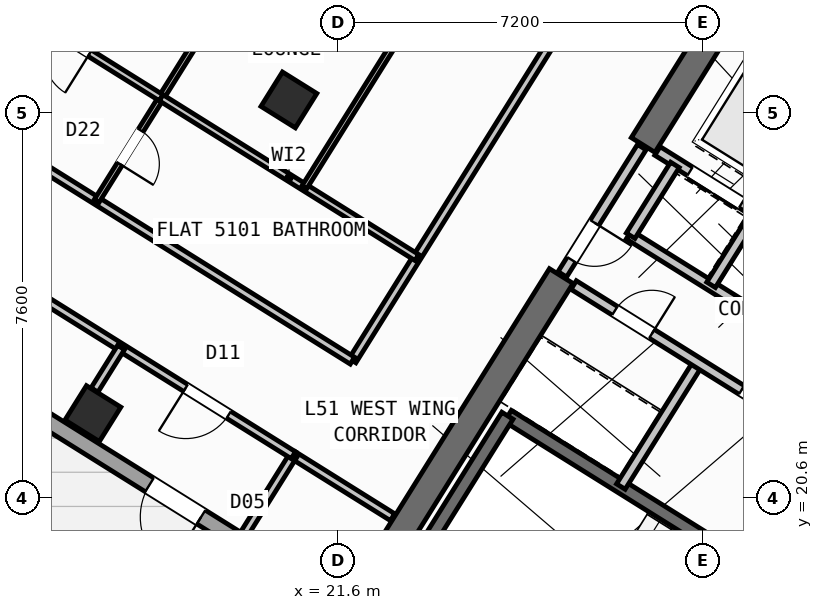
"""IFC4 building model, lengths in metres.
Left out: names, types, materials, properties, quantities, classifications, styles, units other than length and angle.
Written with IfcOpenShell. Run it as: python <this file> out.ifc"""

import sys

from ifc_helpers import new_model, si_unit, direction, frame, frame_2d, origin, origin_2d, place, context, subcontext, project, spatial, rectangle, hollow_rectangle, extrude, source, transform, mapped, element, fill, save


model = new_model("IFC4")
c1 = context("Model", 3, precision=1e-05, world=origin(), true_north=direction((0.0, 1.0)))
c2 = subcontext(c1, "Body", "Model", "MODEL_VIEW")
j1 = project(units=[si_unit("LENGTHUNIT", "METRE"), si_unit("PLANEANGLEUNIT", "RADIAN")], contexts=[c1])
p1 = place(None, origin())
s1 = spatial("IfcSite", under=j1, at=p1, CompositionType="ELEMENT")
p2 = place(p1, origin())
s2 = spatial("IfcBuilding", under=s1, at=p2, CompositionType="ELEMENT")
p3 = place(p2, frame((0.0, 0.0, 204.0)))
s3 = spatial("IfcBuildingStorey", under=s2, at=p3, CompositionType="ELEMENT", Elevation=204.0)
p4 = place(p3, frame((40.573, 24.01, 0.0), z_axis=(0.0, 0.0, 1.0), x_axis=(-0.848047359947, 0.529920442413, 0.0)))
e1 = element("IfcWall", 1, at=p4, inside=s3, PredefinedType="SHEAR", context=c2, shape_type="SweptSolid", body=[
    extrude(rectangle(XDim=13.14, YDim=0.55, at=frame_2d((6.57, 0.0))), origin(), (0.0, 0.0, 1.0), 3.35),
])
p5 = place(p3, frame((29.517, 30.594, 0.0), z_axis=(0.0, 0.0, 1.0), x_axis=(-0.529906864564, -0.848055844204, 0.0)))
e2 = element("IfcWall", 2, at=p5, inside=s3, PredefinedType="SHEAR", context=c2, shape_type="SweptSolid", body=[
    extrude(rectangle(XDim=3.575, YDim=0.55, at=frame_2d((1.788, 0.0))), origin(), (0.0, 0.0, 1.0), 3.35),
])
p6 = place(p3, frame((26.007, 24.976, 0.0), z_axis=(0.0, 0.0, 1.0), x_axis=(-0.529923795287, -0.848045264823, 0.0)))
e3 = element("IfcWall", 3, at=p6, inside=s3, PredefinedType="SHEAR", context=c2, shape_type="SweptSolid", body=[
    extrude(rectangle(XDim=6.425, YDim=0.55, at=frame_2d((3.212, 0.0))), origin(), (0.0, 0.0, 1.0), 3.35),
])
m1 = source(origin(), c2, "Body", "SweptSolid", [
    extrude(hollow_rectangle(XDim=0.8, YDim=0.8, WallThickness=0.032, at=origin_2d()), origin(), (0.0, 0.0, 1.0), 3.6),
])
for number, where, z_axis, x_axis in (
    (4, (20.632, 28.452, 0.0), (0.0, 0.0, 1.0), (-0.848, 0.53, 0.0)),
    (5, (16.764, 22.261, 0.0), (0.0, 0.0, 1.0), (-0.848, 0.53, 0.0)),
):
    element("IfcColumn", number, at=place(p3, frame(where, z_axis=z_axis, x_axis=x_axis)), inside=s3, PredefinedType="COLUMN", context=c2, shape_type="MappedRepresentation", body=[
        mapped(m1, transform((0.0, 0.0, 0.0), scale=1.0)),
    ])
p7 = place(p3, frame((31.76, 12.183, 0.0), z_axis=(0.0, 0.0, 1.0), x_axis=(-0.848047074256, 0.529920899612, 0.0)))
e6 = element("IfcWall", 6, at=p7, inside=s3, PredefinedType="STANDARD", context=c2, shape_type="SweptSolid", body=[
    extrude(rectangle(XDim=30.652, YDim=0.32, at=frame_2d((15.326, 0.0))), origin(), (0.0, 0.0, 1.0), 3.35),
])
p8 = place(p7, frame((15.166, 0.0, 0.0)))
e7 = element("IfcOpeningElement", 7, at=p8, cuts=e6, PredefinedType="OPENING", context=c2, shape_type="SweptSolid", body=[
    extrude(rectangle(XDim=1.2, YDim=2.15, at=frame_2d((0.6, 1.075))), frame((0.0, 0.17, 0.0), z_axis=(0.0, -1.0, 0.0), x_axis=(1.0, 0.0, 0.0)), (0.0, 0.0, 1.0), 0.34),
])
p9 = place(p7, frame((2.24, 0.0, 0.9)))
e8 = element("IfcOpeningElement", 8, at=p9, cuts=e6, PredefinedType="OPENING", context=c2, shape_type="SweptSolid", body=[
    extrude(rectangle(XDim=1.65, YDim=1.45, at=frame_2d((0.825, 0.725))), frame((0.0, 0.17, 0.0), z_axis=(0.0, -1.0, 0.0), x_axis=(1.0, 0.0, 0.0)), (0.0, 0.0, 1.0), 0.34),
])
p10 = place(p7, frame((7.469, 0.0, 0.9)))
e9 = element("IfcOpeningElement", 9, at=p10, cuts=e6, PredefinedType="OPENING", context=c2, shape_type="SweptSolid", body=[
    extrude(rectangle(XDim=1.65, YDim=1.45, at=frame_2d((0.825, 0.725))), frame((0.0, 0.17, 0.0), z_axis=(0.0, -1.0, 0.0), x_axis=(1.0, 0.0, 0.0)), (0.0, 0.0, 1.0), 0.34),
])
p11 = place(p7, frame((12.623, 0.0, 1.0)))
e10 = element("IfcOpeningElement", 10, at=p11, cuts=e6, PredefinedType="OPENING", context=c2, shape_type="SweptSolid", body=[
    extrude(rectangle(XDim=0.9, YDim=1.25, at=frame_2d((0.45, 0.625))), frame((0.0, 0.17, 0.0), z_axis=(0.0, -1.0, 0.0), x_axis=(1.0, 0.0, 0.0)), (0.0, 0.0, 1.0), 0.34),
])
p12 = place(p7, frame((19.556, 0.0, 1.0)))
e11 = element("IfcOpeningElement", 11, at=p12, cuts=e6, PredefinedType="OPENING", context=c2, shape_type="SweptSolid", body=[
    extrude(rectangle(XDim=0.9, YDim=1.25, at=frame_2d((0.45, 0.625))), frame((0.0, 0.17, 0.0), z_axis=(0.0, -1.0, 0.0), x_axis=(1.0, 0.0, 0.0)), (0.0, 0.0, 1.0), 0.34),
])
p13 = place(p7, frame((21.95, 0.0, 1.0)))
e12 = element("IfcOpeningElement", 12, at=p13, cuts=e6, PredefinedType="OPENING", context=c2, shape_type="SweptSolid", body=[
    extrude(rectangle(XDim=0.9, YDim=1.25, at=frame_2d((0.45, 0.625))), frame((0.0, 0.17, 0.0), z_axis=(0.0, -1.0, 0.0), x_axis=(1.0, 0.0, 0.0)), (0.0, 0.0, 1.0), 0.34),
])
p14 = place(p7, frame((26.983, 0.0, 0.9)))
e13 = element("IfcOpeningElement", 13, at=p14, cuts=e6, PredefinedType="OPENING", context=c2, shape_type="SweptSolid", body=[
    extrude(rectangle(XDim=1.35, YDim=1.45, at=frame_2d((0.675, 0.725))), frame((0.0, 0.17, 0.0), z_axis=(0.0, -1.0, 0.0), x_axis=(1.0, 0.0, 0.0)), (0.0, 0.0, 1.0), 0.34),
])
p15 = place(p3, frame((5.7, 28.71, 0.0), z_axis=(0.0, 0.0, 1.0), x_axis=(0.529923711467, 0.8480453172, 0.0)))
e14 = element("IfcWall", 14, at=p15, inside=s3, PredefinedType="STANDARD", context=c2, shape_type="SweptSolid", body=[
    extrude(rectangle(XDim=21.587, YDim=0.32, at=frame_2d((10.794, 0.0))), origin(), (0.0, 0.0, 1.0), 2.825),
])
p16 = place(p15, frame((4.749, 0.0, 1.0)))
e15 = element("IfcOpeningElement", 15, at=p16, cuts=e14, PredefinedType="OPENING", context=c2, shape_type="SweptSolid", body=[
    extrude(rectangle(XDim=0.9, YDim=1.25, at=frame_2d((0.45, 0.625))), frame((0.0, 0.17, 0.0), z_axis=(0.0, -1.0, 0.0), x_axis=(1.0, 0.0, 0.0)), (0.0, 0.0, 1.0), 0.34),
])
p17 = place(p15, frame((9.219, 0.0, 0.9)))
e16 = element("IfcOpeningElement", 16, at=p17, cuts=e14, PredefinedType="OPENING", context=c2, shape_type="SweptSolid", body=[
    extrude(rectangle(XDim=1.35, YDim=1.45, at=frame_2d((0.675, 0.725))), frame((0.0, 0.17, 0.0), z_axis=(0.0, -1.0, 0.0), x_axis=(1.0, 0.0, 0.0)), (0.0, 0.0, 1.0), 0.34),
])
p18 = place(p15, frame((12.119, 0.0, 0.9)))
e17 = element("IfcOpeningElement", 17, at=p18, cuts=e14, PredefinedType="OPENING", context=c2, shape_type="SweptSolid", body=[
    extrude(rectangle(XDim=1.35, YDim=1.45, at=frame_2d((0.675, 0.725))), frame((0.0, 0.17, 0.0), z_axis=(0.0, -1.0, 0.0), x_axis=(1.0, 0.0, 0.0)), (0.0, 0.0, 1.0), 0.34),
])
p19 = place(p15, frame((16.5, 0.0, 1.0)))
e18 = element("IfcOpeningElement", 18, at=p19, cuts=e14, PredefinedType="OPENING", context=c2, shape_type="SweptSolid", body=[
    extrude(rectangle(XDim=0.9, YDim=1.25, at=frame_2d((0.45, 0.625))), frame((0.0, 0.17, 0.0), z_axis=(0.0, -1.0, 0.0), x_axis=(1.0, 0.0, 0.0)), (0.0, 0.0, 1.0), 0.34),
])
p20 = place(p15, frame((18.913, 0.0, 1.0)))
e19 = element("IfcOpeningElement", 19, at=p20, cuts=e14, PredefinedType="OPENING", context=c2, shape_type="SweptSolid", body=[
    extrude(rectangle(XDim=0.9, YDim=1.25, at=frame_2d((0.45, 0.625))), frame((0.0, 0.17, 0.0), z_axis=(0.0, -1.0, 0.0), x_axis=(1.0, 0.0, 0.0)), (0.0, 0.0, 1.0), 0.34),
])
p21 = place(p3, frame((31.28, 18.261, 0.0), z_axis=(0.0, 0.0, 1.0), x_axis=(-0.848051618787, 0.529913626805, 0.0)))
e20 = element("IfcWall", 20, at=p21, inside=s3, PredefinedType="SHEAR", context=c2, shape_type="SweptSolid", body=[
    extrude(rectangle(XDim=7.46, YDim=0.26, at=frame_2d((3.73, 0.0))), origin(), (0.0, 0.0, 1.0), 3.35),
])
p22 = place(p21, frame((0.36, 0.0, 0.0)))
e21 = element("IfcOpeningElement", 21, at=p22, cuts=e20, PredefinedType="OPENING", context=c2, shape_type="SweptSolid", body=[
    extrude(rectangle(XDim=0.86, YDim=2.05, at=frame_2d((0.43, 1.025))), frame((0.0, 0.14, 0.0), z_axis=(0.0, -1.0, 0.0), x_axis=(1.0, 0.0, 0.0)), (0.0, 0.0, 1.0), 0.28),
])
p23 = place(p3, frame((24.945, 22.22, 0.0), z_axis=(0.0, 0.0, 1.0), x_axis=(-0.529908658664, -0.84805472316, 0.0)))
e22 = element("IfcWall", 22, at=p23, inside=s3, PredefinedType="SHEAR", context=c2, shape_type="SweptSolid", body=[
    extrude(rectangle(XDim=3.16, YDim=0.26, at=frame_2d((1.58, 0.0))), origin(), (0.0, 0.0, 1.0), 3.35),
])
p24 = place(p3, frame((31.822, 24.998, 0.0), z_axis=(0.0, 0.0, 1.0), x_axis=(-0.848036912365, 0.52993716162, 0.0)))
e23 = element("IfcWall", 23, at=p24, inside=s3, PredefinedType="STANDARD", context=c2, shape_type="SweptSolid", body=[
    extrude(rectangle(XDim=4.618, YDim=0.2, at=frame_2d((2.309, 0.0))), origin(), (0.0, 0.0, 1.0), 3.34),
])
p25 = place(p24, frame((0.52, 0.0, 0.0)))
e24 = element("IfcOpeningElement", 24, at=p25, cuts=e23, PredefinedType="OPENING", context=c2, shape_type="SweptSolid", body=[
    extrude(rectangle(XDim=1.2, YDim=2.15, at=frame_2d((0.6, 1.075))), frame((0.0, 0.11, 0.0), z_axis=(0.0, -1.0, 0.0), x_axis=(1.0, 0.0, 0.0)), (0.0, 0.0, 1.0), 0.22),
])
p26 = place(p24, frame((2.66, 0.0, 0.0)))
e25 = element("IfcOpeningElement", 25, at=p26, cuts=e23, PredefinedType="OPENING", context=c2, shape_type="SweptSolid", body=[
    extrude(rectangle(XDim=1.2, YDim=2.15, at=frame_2d((0.6, 1.075))), frame((0.0, 0.11, 0.0), z_axis=(0.0, -1.0, 0.0), x_axis=(1.0, 0.0, 0.0)), (0.0, 0.0, 1.0), 0.22),
])
p27 = place(p3, frame((32.108, 22.814, 0.0), z_axis=(0.0, 0.0, 1.0), x_axis=(-0.848042229521, 0.529928652696, 0.0)))
e26 = element("IfcWall", 26, at=p27, inside=s3, PredefinedType="STANDARD", context=c2, shape_type="SweptSolid", body=[
    extrude(rectangle(XDim=5.62, YDim=0.2, at=frame_2d((2.81, 0.0))), origin(), (0.0, 0.0, 1.0), 3.34),
])
p28 = place(p3, frame((28.25, 27.17, 0.0), z_axis=(0.0, 0.0, 1.0), x_axis=(-0.529905827651, -0.848056492117, 0.0)))
e27 = element("IfcWall", 27, at=p28, inside=s3, PredefinedType="STANDARD", context=c2, shape_type="SweptSolid", body=[
    extrude(rectangle(XDim=1.65, YDim=0.2, at=frame_2d((0.825, 0.0))), origin(), (0.0, 0.0, 1.0), 3.34),
])
p29 = place(p3, frame((33.363, 27.69, 0.0), z_axis=(0.0, 0.0, 1.0), x_axis=(-0.848047090064, 0.529920874315, 0.0)))
e28 = element("IfcWall", 28, at=p29, inside=s3, PredefinedType="STANDARD", context=c2, shape_type="SweptSolid", body=[
    extrude(rectangle(XDim=4.498, YDim=0.2, at=frame_2d((2.249, 0.0))), origin(), (0.0, 0.0, 1.0), 3.34),
])
p30 = place(p3, frame((29.801, 26.142, 0.0), z_axis=(0.0, 0.0, 1.0), x_axis=(-0.529998940003, -0.847998304005, 0.0)))
e29 = element("IfcWall", 29, at=p30, inside=s3, PredefinedType="STANDARD", context=c2, shape_type="SweptSolid", body=[
    extrude(rectangle(XDim=1.58, YDim=0.2, at=frame_2d((0.79, 0.0))), origin(), (0.0, 0.0, 1.0), 3.34),
])
p31 = place(p3, frame((28.71, 23.263, 0.0), z_axis=(0.0, 0.0, 1.0), x_axis=(-0.529907497854, -0.848055448493, 0.0)))
e30 = element("IfcWall", 30, at=p31, inside=s3, PredefinedType="STANDARD", context=c2, shape_type="SweptSolid", body=[
    extrude(rectangle(XDim=2.88, YDim=0.2, at=frame_2d((1.44, 0.0))), origin(), (0.0, 0.0, 1.0), 3.34),
])
p32 = place(p3, frame((31.525, 21.504, 0.0), z_axis=(0.0, 0.0, 1.0), x_axis=(-0.848040211232, 0.529931882541, 0.0)))
e31 = element("IfcWall", 31, at=p32, inside=s3, PredefinedType="STANDARD", context=c2, shape_type="SweptSolid", body=[
    extrude(rectangle(XDim=6.218, YDim=0.2, at=frame_2d((3.109, 0.0))), origin(), (0.0, 0.0, 1.0), 3.34),
])
p33 = place(p32, frame((4.4, 0.0, 0.0)))
e32 = element("IfcOpeningElement", 32, at=p33, cuts=e31, PredefinedType="OPENING", context=c2, shape_type="SweptSolid", body=[
    extrude(rectangle(XDim=0.86, YDim=2.05, at=frame_2d((0.43, 1.025))), frame((0.0, 0.11, 0.0), z_axis=(0.0, -1.0, 0.0), x_axis=(1.0, 0.0, 0.0)), (0.0, 0.0, 1.0), 0.22),
])
p34 = place(p32, frame((1.45, 0.0, 0.0)))
e33 = element("IfcOpeningElement", 33, at=p34, cuts=e31, PredefinedType="OPENING", context=c2, shape_type="SweptSolid", body=[
    extrude(rectangle(XDim=0.86, YDim=2.05, at=frame_2d((0.43, 1.025))), frame((0.0, 0.11, 0.0), z_axis=(0.0, -1.0, 0.0), x_axis=(1.0, 0.0, 0.0)), (0.0, 0.0, 1.0), 0.22),
])
p35 = place(p3, frame((27.596, 27.52, 0.0), z_axis=(0.0, 0.0, 1.0), x_axis=(-0.529865479138, -0.848081702443, 0.0)))
e34 = element("IfcWall", 34, at=p35, inside=s3, PredefinedType="STANDARD", context=c2, shape_type="SweptSolid", body=[
    extrude(rectangle(XDim=2.96, YDim=0.2, at=frame_2d((1.48, 0.0))), origin(), (0.0, 0.0, 1.0), 3.34),
])
p36 = place(p35, frame((1.76, 0.0, 0.0)))
e35 = element("IfcOpeningElement", 35, at=p36, cuts=e34, PredefinedType="OPENING", context=c2, shape_type="SweptSolid", body=[
    extrude(rectangle(XDim=0.86, YDim=2.05, at=frame_2d((0.43, 1.025))), frame((0.0, 0.11, 0.0), z_axis=(0.0, -1.0, 0.0), x_axis=(1.0, 0.0, 0.0)), (0.0, 0.0, 1.0), 0.22),
])
p37 = place(p3, frame((22.677, 20.217, 0.0), z_axis=(0.0, 0.0, 1.0), x_axis=(-0.848057719594, 0.529903863203, 0.0)))
e36 = element("IfcWall", 36, at=p37, inside=s3, PredefinedType="PARTITIONING", context=c2, shape_type="SweptSolid", body=[
    extrude(rectangle(XDim=2.308, YDim=0.16, at=frame_2d((1.154, 0.0))), origin(), (0.0, 0.0, 1.0), 3.34),
])
p38 = place(p3, frame((31.239, 38.274, 0.0), z_axis=(0.0, 0.0, 1.0), x_axis=(-0.529918119251, -0.84804881162, 0.0)))
e37 = element("IfcWall", 37, at=p38, inside=s3, PredefinedType="PARTITIONING", context=c2, shape_type="SweptSolid", body=[
    extrude(rectangle(XDim=17.65, YDim=0.16, at=frame_2d((8.825, 0.0))), origin(), (0.0, 0.0, 1.0), 3.34),
])
p39 = place(p3, frame((20.719, 21.44, 0.0), z_axis=(0.0, 0.0, 1.0), x_axis=(-0.529880305451, -0.848072439061, 0.0)))
e38 = element("IfcWall", 38, at=p39, inside=s3, PredefinedType="PARTITIONING", context=c2, shape_type="SweptSolid", body=[
    extrude(rectangle(XDim=1.85, YDim=0.16, at=frame_2d((0.925, 0.0))), origin(), (0.0, 0.0, 1.0), 3.34),
])
p40 = place(p3, frame((21.885, 23.306, 0.0), z_axis=(0.0, 0.0, 1.0), x_axis=(-0.848052408131, 0.529912363569, 0.0)))
e39 = element("IfcWall", 39, at=p40, inside=s3, PredefinedType="PARTITIONING", context=c2, shape_type="SweptSolid", body=[
    extrude(rectangle(XDim=16.73, YDim=0.16, at=frame_2d((8.365, 0.0))), origin(), (0.0, 0.0, 1.0), 3.34),
])
p41 = place(p40, frame((7.57, 0.0, 0.0)))
e40 = element("IfcOpeningElement", 40, at=p41, cuts=e39, PredefinedType="OPENING", context=c2, shape_type="SweptSolid", body=[
    extrude(rectangle(XDim=1.0, YDim=2.1, at=frame_2d((0.5, 1.05))), frame((0.0, 0.09, 0.0), z_axis=(0.0, -1.0, 0.0), x_axis=(1.0, 0.0, 0.0)), (0.0, 0.0, 1.0), 0.18),
])
p42 = place(p40, frame((11.14, 0.0, 0.0)))
e41 = element("IfcOpeningElement", 41, at=p42, cuts=e39, PredefinedType="OPENING", context=c2, shape_type="SweptSolid", body=[
    extrude(rectangle(XDim=1.0, YDim=2.1, at=frame_2d((0.5, 1.05))), frame((0.0, 0.09, 0.0), z_axis=(0.0, -1.0, 0.0), x_axis=(1.0, 0.0, 0.0)), (0.0, 0.0, 1.0), 0.18),
])
p43 = place(p3, frame((20.719, 21.44, 0.0), z_axis=(0.0, 0.0, 1.0), x_axis=(-0.848048310262, 0.529918921593, 0.0)))
e42 = element("IfcWall", 42, at=p43, inside=s3, PredefinedType="PARTITIONING", context=c2, shape_type="SweptSolid", body=[
    extrude(rectangle(XDim=16.73, YDim=0.16, at=frame_2d((8.365, 0.0))), origin(), (0.0, 0.0, 1.0), 3.34),
])
p44 = place(p43, frame((1.505, 0.0, 0.0)))
e43 = element("IfcOpeningElement", 43, at=p44, cuts=e42, PredefinedType="OPENING", context=c2, shape_type="SweptSolid", body=[
    extrude(rectangle(XDim=1.0, YDim=2.1, at=frame_2d((0.5, 1.05))), frame((0.0, 0.09, 0.0), z_axis=(0.0, -1.0, 0.0), x_axis=(1.0, 0.0, 0.0)), (0.0, 0.0, 1.0), 0.18),
])
p45 = place(p43, frame((6.435, 0.0, 0.0)))
e44 = element("IfcOpeningElement", 44, at=p45, cuts=e42, PredefinedType="OPENING", context=c2, shape_type="SweptSolid", body=[
    extrude(rectangle(XDim=1.0, YDim=2.1, at=frame_2d((0.5, 1.05))), frame((0.0, 0.09, 0.0), z_axis=(0.0, -1.0, 0.0), x_axis=(1.0, 0.0, 0.0)), (0.0, 0.0, 1.0), 0.18),
])
p46 = place(p43, frame((12.784, 0.0, 0.0)))
e45 = element("IfcOpeningElement", 45, at=p46, cuts=e42, PredefinedType="OPENING", context=c2, shape_type="SweptSolid", body=[
    extrude(rectangle(XDim=1.0, YDim=2.1, at=frame_2d((0.5, 1.05))), frame((0.0, 0.09, 0.0), z_axis=(0.0, -1.0, 0.0), x_axis=(1.0, 0.0, 0.0)), (0.0, 0.0, 1.0), 0.18),
])
p47 = place(p3, frame((17.319, 23.565, 0.0), z_axis=(0.0, 0.0, 1.0), x_axis=(-0.529821225456, -0.848109349704, 0.0)))
e46 = element("IfcWall", 46, at=p47, inside=s3, PredefinedType="PARTITIONING", context=c2, shape_type="SweptSolid", body=[
    extrude(rectangle(XDim=0.988, YDim=0.16, at=frame_2d((0.494, 0.0))), origin(), (0.0, 0.0, 1.0), 2.825),
])
p48 = place(p3, frame((26.336, 41.656, 0.0), z_axis=(0.0, 0.0, 1.0), x_axis=(-0.529916887708, -0.848049581169, 0.0)))
e47 = element("IfcWall", 47, at=p48, inside=s3, PredefinedType="PARTITIONING", context=c2, shape_type="SweptSolid", body=[
    extrude(rectangle(XDim=17.92, YDim=0.11, at=frame_2d((8.96, 0.0))), origin(), (0.0, 0.0, 1.0), 2.995),
])
p49 = place(p48, frame((16.28, 0.0, 0.0)))
e48 = element("IfcOpeningElement", 48, at=p49, cuts=e47, PredefinedType="OPENING", context=c2, shape_type="SweptSolid", body=[
    extrude(rectangle(XDim=0.78, YDim=2.05, at=frame_2d((0.39, 1.025))), frame((0.0, 0.065, 0.0), z_axis=(0.0, -1.0, 0.0), x_axis=(1.0, 0.0, 0.0)), (0.0, 0.0, 1.0), 0.13),
])
p50 = place(p48, frame((7.3, 0.0, 0.0)))
e49 = element("IfcOpeningElement", 49, at=p50, cuts=e47, PredefinedType="OPENING", context=c2, shape_type="SweptSolid", body=[
    extrude(rectangle(XDim=0.92, YDim=2.08, at=frame_2d((0.46, 1.04))), frame((0.0, 0.065, 0.0), z_axis=(0.0, -1.0, 0.0), x_axis=(1.0, 0.0, 0.0)), (0.0, 0.0, 1.0), 0.13),
])
p51 = place(p3, frame((18.111, 28.494, 0.0), z_axis=(0.0, 0.0, 1.0), x_axis=(-0.848024181217, 0.529957534215, 0.0)))
e50 = element("IfcWall", 50, at=p51, inside=s3, PredefinedType="PLUMBINGWALL", context=c2, shape_type="SweptSolid", body=[
    extrude(rectangle(XDim=4.24, YDim=0.14, at=frame_2d((2.12, 0.0))), origin(), (0.0, 0.0, 1.0), 3.34),
])
p52 = place(p51, frame((1.66, 0.0, 0.0)))
e51 = element("IfcOpeningElement", 51, at=p52, cuts=e50, PredefinedType="OPENING", context=c2, shape_type="SweptSolid", body=[
    extrude(rectangle(XDim=0.92, YDim=2.08, at=frame_2d((0.46, 1.04))), frame((0.0, 0.08, 0.0), z_axis=(0.0, -1.0, 0.0), x_axis=(1.0, 0.0, 0.0)), (0.0, 0.0, 1.0), 0.16),
])
p53 = place(p3, frame((23.157, 25.341, 0.0), z_axis=(0.0, 0.0, 1.0), x_axis=(-0.848062843461, 0.529895662882, 0.0)))
e52 = element("IfcWall", 52, at=p53, inside=s3, PredefinedType="PLUMBINGWALL", context=c2, shape_type="SweptSolid", body=[
    extrude(rectangle(XDim=5.95, YDim=0.14, at=frame_2d((2.975, 0.0))), origin(), (0.0, 0.0, 1.0), 3.34),
])
p54 = place(p3, frame((29.161, 39.89, 0.0), z_axis=(0.0, 0.0, 1.0), x_axis=(-0.529915512424, -0.848050440535, 0.0)))
e53 = element("IfcWall", 53, at=p54, inside=s3, PredefinedType="PARTITIONING", context=c2, shape_type="SweptSolid", body=[
    extrude(rectangle(XDim=15.52, YDim=0.11, at=frame_2d((7.76, 0.0))), origin(), (0.0, 0.0, 1.0), 3.34),
])
p55 = place(p54, frame((7.345, 0.0, 0.0)))
e54 = element("IfcOpeningElement", 54, at=p55, cuts=e53, PredefinedType="OPENING", context=c2, shape_type="SweptSolid", body=[
    extrude(rectangle(XDim=0.92, YDim=2.08, at=frame_2d((0.46, 1.04))), frame((0.0, 0.065, 0.0), z_axis=(0.0, -1.0, 0.0), x_axis=(1.0, 0.0, 0.0)), (0.0, 0.0, 1.0), 0.13),
])
p56 = place(p3, frame((41.936, 26.012, 0.0), z_axis=(0.0, 0.0, 1.0), x_axis=(-0.848051154596, 0.529914369676, 0.0)))
e55 = element("IfcWall", 55, at=p56, inside=s3, PredefinedType="PARTITIONING", context=c2, shape_type="SweptSolid", body=[
    extrude(rectangle(XDim=15.57, YDim=0.16, at=frame_2d((7.785, 0.0))), origin(), (0.0, 0.0, 1.0), 3.34),
])
p57 = place(p56, frame((10.83, 0.0, 0.0)))
e56 = element("IfcOpeningElement", 56, at=p57, cuts=e55, PredefinedType="OPENING", context=c2, shape_type="SweptSolid", body=[
    extrude(rectangle(XDim=1.0, YDim=2.1, at=frame_2d((0.5, 1.05))), frame((0.0, 0.09, 0.0), z_axis=(0.0, -1.0, 0.0), x_axis=(1.0, 0.0, 0.0)), (0.0, 0.0, 1.0), 0.18),
])
m2 = source(origin(), c2, "Body", "SweptSolid", [
    extrude(rectangle(XDim=1.2, YDim=2.15, at=frame_2d((0.6, 1.075))), frame((0.0, 0.025, 0.0), z_axis=(0.0, -1.0, 0.0), x_axis=(1.0, 0.0, 0.0)), (0.0, 0.0, 1.0), 0.05),
])
p58 = place(p8, origin())
e57 = element("IfcDoor", 57, at=p58, inside=s3, OperationType="SINGLE_SWING_LEFT", PredefinedType="DOOR", context=c2, shape_type="MappedRepresentation", body=[
    mapped(m2, transform((0.0, 0.0, 0.0), scale=1.0)),
])
fill(e7, e57)
p59 = place(p26, origin())
e58 = element("IfcDoor", 58, at=p59, inside=s3, OperationType="DOUBLE_DOOR_SLIDING", PredefinedType="DOOR", context=c2, shape_type="MappedRepresentation", body=[
    mapped(m2, transform((0.0, 0.0, 0.0), scale=1.0)),
])
fill(e25, e58)
m3 = source(origin(), c2, "Body", "SweptSolid", [
    extrude(rectangle(XDim=0.86, YDim=2.05, at=frame_2d((0.43, 1.025))), frame((0.0, 0.025, 0.0), z_axis=(0.0, -1.0, 0.0), x_axis=(1.0, 0.0, 0.0)), (0.0, 0.0, 1.0), 0.05),
])
p60 = place(p33, frame((0.86, 0.0, 0.0), z_axis=(0.0, 0.0, 1.0), x_axis=(-1.0, 0.0, 0.0)))
e59 = element("IfcDoor", 59, at=p60, inside=s3, OperationType="SINGLE_SWING_RIGHT", PredefinedType="DOOR", context=c2, shape_type="MappedRepresentation", body=[
    mapped(m3, transform((0.0, 0.0, 0.0), scale=1.0)),
])
fill(e32, e59)
p61 = place(p34, frame((0.86, 0.0, 0.0), z_axis=(0.0, 0.0, 1.0), x_axis=(-1.0, 0.0, 0.0)))
e60 = element("IfcDoor", 60, at=p61, inside=s3, OperationType="SINGLE_SWING_LEFT", PredefinedType="DOOR", context=c2, shape_type="MappedRepresentation", body=[
    mapped(m3, transform((0.0, 0.0, 0.0), scale=1.0)),
])
fill(e33, e60)
p62 = place(p36, origin())
e61 = element("IfcDoor", 61, at=p62, inside=s3, OperationType="SINGLE_SWING_LEFT", PredefinedType="DOOR", context=c2, shape_type="MappedRepresentation", body=[
    mapped(m3, transform((0.0, 0.0, 0.0), scale=1.0)),
])
fill(e35, e61)
m4 = source(origin(), c2, "Body", "SweptSolid", [
    extrude(rectangle(XDim=1.0, YDim=2.1, at=frame_2d((0.5, 1.05))), frame((0.0, 0.025, 0.0), z_axis=(0.0, -1.0, 0.0), x_axis=(1.0, 0.0, 0.0)), (0.0, 0.0, 1.0), 0.05),
])
p63 = place(p44, origin())
e62 = element("IfcDoor", 62, at=p63, inside=s3, OperationType="SINGLE_SWING_RIGHT", PredefinedType="DOOR", context=c2, shape_type="MappedRepresentation", body=[
    mapped(m4, transform((0.0, 0.0, 0.0), scale=1.0)),
])
fill(e43, e62)
m5 = source(origin(), c2, "Body", "SweptSolid", [
    extrude(rectangle(XDim=0.92, YDim=2.08, at=frame_2d((0.46, 1.04))), frame((0.0, 0.025, 0.0), z_axis=(0.0, -1.0, 0.0), x_axis=(1.0, 0.0, 0.0)), (0.0, 0.0, 1.0), 0.05),
])
p64 = place(p52, origin())
e63 = element("IfcDoor", 63, at=p64, inside=s3, OperationType="SINGLE_SWING_LEFT", PredefinedType="DOOR", context=c2, shape_type="MappedRepresentation", body=[
    mapped(m5, transform((0.0, 0.0, 0.0), scale=1.0)),
])
fill(e51, e63)
m6 = source(origin(), c2, "Body", "SweptSolid", [
    extrude(rectangle(XDim=0.78, YDim=2.05, at=frame_2d((0.39, 1.025))), frame((0.0, 0.025, 0.0), z_axis=(0.0, -1.0, 0.0), x_axis=(1.0, 0.0, 0.0)), (0.0, 0.0, 1.0), 0.05),
])
p65 = place(p49, origin())
e64 = element("IfcDoor", 64, at=p65, inside=s3, OperationType="SINGLE_SWING_RIGHT", PredefinedType="DOOR", context=c2, shape_type="MappedRepresentation", body=[
    mapped(m6, transform((0.0, 0.0, 0.0), scale=1.0)),
])
fill(e48, e64)
save(model, sys.argv[1])
